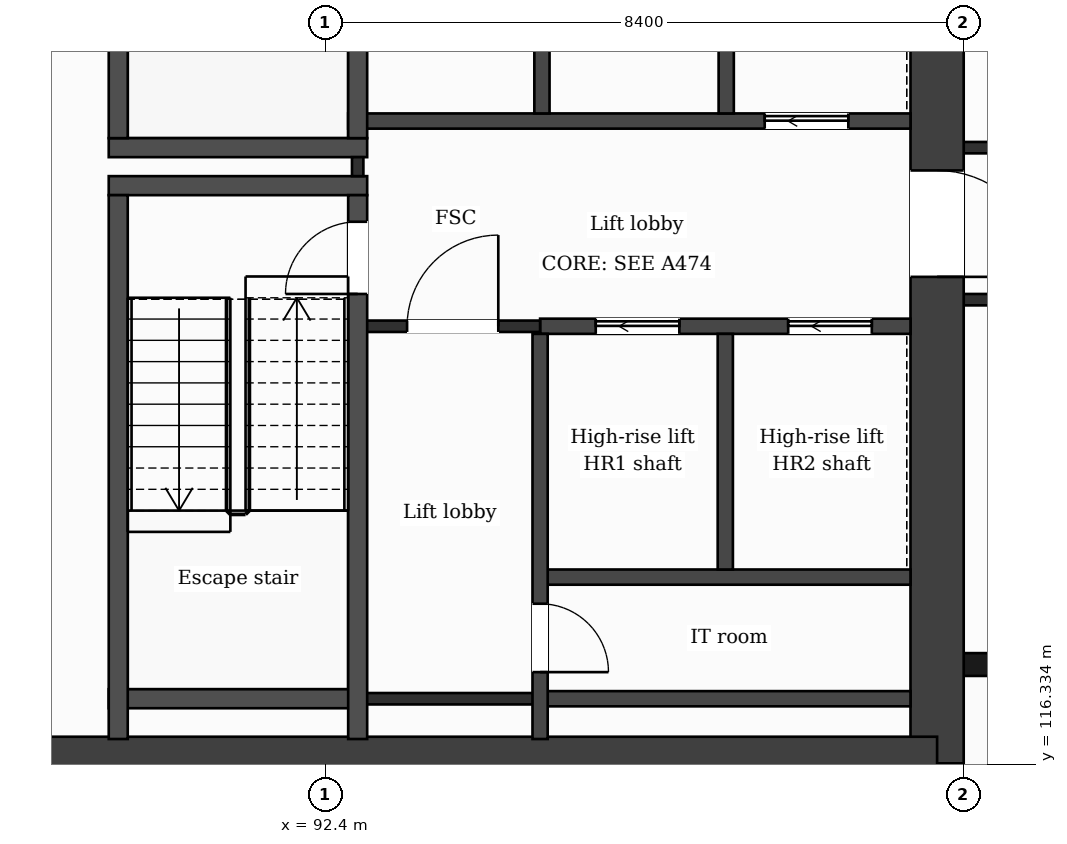
"""IFC4 building model, lengths in metres.
Left out: names, types, materials, properties, quantities, classifications, styles, units other than length and angle.
Written with IfcOpenShell. Run it as: python <this file> out.ifc"""

import sys

from ifc_helpers import new_model, si_unit, direction, frame, frame_2d, origin, place, context, subcontext, project, spatial, rectangle, extrude, element, fill, save


model = new_model("IFC4")
c1 = context("Model", 3, precision=1e-05, world=origin(), true_north=direction((0.0, 1.0)))
c2 = subcontext(c1, "Body", "Model", "MODEL_VIEW")
j1 = project(units=[si_unit("LENGTHUNIT", "METRE"), si_unit("PLANEANGLEUNIT", "RADIAN")], contexts=[c1])
p1 = place(None, origin())
s1 = spatial("IfcSite", under=j1, at=p1, CompositionType="ELEMENT")
p2 = place(p1, origin())
s2 = spatial("IfcBuilding", under=s1, at=p2, CompositionType="ELEMENT")
p3 = place(p2, frame((0.0, 0.0, 299.7)))
s3 = spatial("IfcBuildingStorey", under=s2, at=p3, CompositionType="ELEMENT", Elevation=299.7)
p4 = place(p3, frame((100.45, 132.05, 0.0), z_axis=(0.0, 0.0, 1.0), x_axis=(0.0, -1.0, 0.0)))
e1 = element("IfcWall", 1, at=p4, inside=s3, PredefinedType="SHEAR", context=c2, shape_type="SweptSolid", body=[
    extrude(rectangle(XDim=15.7, YDim=0.7, at=frame_2d((7.85, 0.0))), origin(), (0.0, 0.0, 1.0), 3.7),
])
p5 = place(p4, frame((7.9, 0.0, 0.0)))
e2 = element("IfcOpeningElement", 2, at=p5, cuts=e1, PredefinedType="OPENING", context=c2, shape_type="SweptSolid", body=[
    extrude(rectangle(XDim=1.4, YDim=2.1, at=frame_2d((0.7, 1.05))), frame((0.0, 0.36, 0.0), z_axis=(0.0, -1.0, 0.0), x_axis=(1.0, 0.0, 0.0)), (0.0, 0.0, 1.0), 0.72),
])
p6 = place(p3, frame((100.45, 116.35, 0.0), z_axis=(0.0, 0.0, 1.0), x_axis=(-1.0, 0.0, 0.0)))
e3 = element("IfcWall", 3, at=p6, inside=s3, PredefinedType="SHEAR", context=c2, shape_type="SweptSolid", body=[
    extrude(rectangle(XDim=13.627, YDim=0.7, at=frame_2d((6.813, 0.0))), origin(), (0.0, 0.0, 1.0), 3.7),
])
p7 = place(p3, frame((86.823, 116.35, 0.0), z_axis=(0.0, 0.0, 1.0), x_axis=(0.133416378607, 0.99106007382, 0.0)))
e4 = element("IfcWall", 4, at=p7, inside=s3, PredefinedType="SHEAR", context=c2, shape_type="SweptSolid", body=[
    extrude(rectangle(XDim=15.842, YDim=0.7, at=frame_2d((7.921, 0.0))), origin(), (0.0, 0.0, 1.0), 3.7),
])
p8 = place(p3, frame((100.8, 117.65, 0.0), z_axis=(0.0, 0.0, 1.0), x_axis=(1.0, 0.0, 0.0)))
e5 = element("IfcWall", 5, at=p8, inside=s3, PredefinedType="SOLIDWALL", context=c2, shape_type="SweptSolid", body=[
    extrude(rectangle(XDim=25.2, YDim=0.3, at=frame_2d((12.6, 0.0))), origin(), (0.0, 0.0, 1.0), 3.25),
])
p9 = place(p8, frame((0.95, 0.0, 0.9)))
e6 = element("IfcOpeningElement", 6, at=p9, cuts=e5, PredefinedType="OPENING", context=c2, shape_type="SweptSolid", body=[
    extrude(rectangle(XDim=2.4, YDim=2.1, at=frame_2d((1.2, 1.05))), frame((0.0, 0.16, 0.0), z_axis=(0.0, -1.0, 0.0), x_axis=(1.0, 0.0, 0.0)), (0.0, 0.0, 1.0), 0.32),
])
p10 = place(p8, frame((5.1, 0.0, 0.9)))
e7 = element("IfcOpeningElement", 7, at=p10, cuts=e5, PredefinedType="OPENING", context=c2, shape_type="SweptSolid", body=[
    extrude(rectangle(XDim=2.4, YDim=2.1, at=frame_2d((1.2, 1.05))), frame((0.0, 0.16, 0.0), z_axis=(0.0, -1.0, 0.0), x_axis=(1.0, 0.0, 0.0)), (0.0, 0.0, 1.0), 0.32),
])
p11 = place(p8, frame((9.3, 0.0, 0.9)))
e8 = element("IfcOpeningElement", 8, at=p11, cuts=e5, PredefinedType="OPENING", context=c2, shape_type="SweptSolid", body=[
    extrude(rectangle(XDim=2.4, YDim=2.1, at=frame_2d((1.2, 1.05))), frame((0.0, 0.16, 0.0), z_axis=(0.0, -1.0, 0.0), x_axis=(1.0, 0.0, 0.0)), (0.0, 0.0, 1.0), 0.32),
])
p12 = place(p8, frame((14.1, 0.0, 0.9)))
e9 = element("IfcOpeningElement", 9, at=p12, cuts=e5, PredefinedType="OPENING", context=c2, shape_type="SweptSolid", body=[
    extrude(rectangle(XDim=1.2, YDim=2.1, at=frame_2d((0.6, 1.05))), frame((0.0, 0.16, 0.0), z_axis=(0.0, -1.0, 0.0), x_axis=(1.0, 0.0, 0.0)), (0.0, 0.0, 1.0), 0.32),
])
p13 = place(p8, frame((18.3, 0.0, 0.9)))
e10 = element("IfcOpeningElement", 10, at=p13, cuts=e5, PredefinedType="OPENING", context=c2, shape_type="SweptSolid", body=[
    extrude(rectangle(XDim=1.2, YDim=2.1, at=frame_2d((0.6, 1.05))), frame((0.0, 0.16, 0.0), z_axis=(0.0, -1.0, 0.0), x_axis=(1.0, 0.0, 0.0)), (0.0, 0.0, 1.0), 0.32),
])
p14 = place(p8, frame((21.75, 0.0, 0.0)))
e11 = element("IfcOpeningElement", 11, at=p14, cuts=e5, PredefinedType="OPENING", context=c2, shape_type="SweptSolid", body=[
    extrude(rectangle(XDim=1.2, YDim=2.4, at=frame_2d((0.6, 1.2))), frame((0.0, 0.16, 0.0), z_axis=(0.0, -1.0, 0.0), x_axis=(1.0, 0.0, 0.0)), (0.0, 0.0, 1.0), 0.32),
])
p15 = place(p8, frame((23.55, 0.0, 0.9)))
e12 = element("IfcOpeningElement", 12, at=p15, cuts=e5, PredefinedType="OPENING", context=c2, shape_type="SweptSolid", body=[
    extrude(rectangle(XDim=1.2, YDim=2.1, at=frame_2d((0.6, 1.05))), frame((0.0, 0.16, 0.0), z_axis=(0.0, -1.0, 0.0), x_axis=(1.0, 0.0, 0.0)), (0.0, 0.0, 1.0), 0.32),
])
p16 = place(p3, frame((95.227, 117.2, 0.0), z_axis=(0.0, 0.0, 1.0), x_axis=(1.0, 0.0, 0.0)))
e13 = element("IfcWall", 13, at=p16, inside=s3, PredefinedType="PARTITIONING", context=c2, shape_type="SweptSolid", body=[
    extrude(rectangle(XDim=4.873, YDim=0.2, at=frame_2d((2.437, 0.0))), origin(), (0.0, 0.0, 1.0), 3.25),
])
p17 = place(p3, frame((92.827, 117.2, 0.0), z_axis=(0.0, 0.0, 1.0), x_axis=(1.0, 0.0, 0.0)))
e14 = element("IfcWall", 14, at=p17, inside=s3, PredefinedType="PARTITIONING", context=c2, shape_type="SweptSolid", body=[
    extrude(rectangle(XDim=2.4, YDim=0.15, at=frame_2d((1.2, 0.0))), origin(), (0.0, 0.0, 1.0), 3.25),
])
p18 = place(p3, frame((89.552, 117.2, 0.0), z_axis=(0.0, 0.0, 1.0), x_axis=(1.0, 0.0, 0.0)))
e15 = element("IfcWall", 15, at=p18, inside=s3, PredefinedType="PARTITIONING", context=c2, shape_type="SweptSolid", body=[
    extrude(rectangle(XDim=3.275, YDim=0.25, at=frame_2d((1.637, 0.0))), origin(), (0.0, 0.0, 1.0), 3.25),
])
p19 = place(p3, frame((95.227, 118.8, 0.0), z_axis=(0.0, 0.0, 1.0), x_axis=(1.0, 0.0, 0.0)))
e16 = element("IfcWall", 16, at=p19, inside=s3, PredefinedType="PARTITIONING", context=c2, shape_type="SweptSolid", body=[
    extrude(rectangle(XDim=4.873, YDim=0.2, at=frame_2d((2.437, 0.0))), origin(), (0.0, 0.0, 1.0), 3.25),
])
p20 = place(p3, frame((95.227, 122.1, 0.0), z_axis=(0.0, 0.0, 1.0), x_axis=(1.0, 0.0, 0.0)))
e17 = element("IfcWall", 17, at=p20, inside=s3, PredefinedType="PARTITIONING", context=c2, shape_type="SweptSolid", body=[
    extrude(rectangle(XDim=4.873, YDim=0.2, at=frame_2d((2.437, 0.0))), origin(), (0.0, 0.0, 1.0), 3.25),
])
p21 = place(p20, frame((0.732, 0.0, 0.0)))
e18 = element("IfcOpeningElement", 18, at=p21, cuts=e17, PredefinedType="OPENING", context=c2, shape_type="SweptSolid", body=[
    extrude(rectangle(XDim=1.1, YDim=2.1, at=frame_2d((0.55, 1.05))), frame((0.0, 0.11, 0.0), z_axis=(0.0, -1.0, 0.0), x_axis=(1.0, 0.0, 0.0)), (0.0, 0.0, 1.0), 0.22),
])
p22 = place(p20, frame((3.264, 0.0, 0.0)))
e19 = element("IfcOpeningElement", 19, at=p22, cuts=e17, PredefinedType="OPENING", context=c2, shape_type="SweptSolid", body=[
    extrude(rectangle(XDim=1.1, YDim=2.1, at=frame_2d((0.55, 1.05))), frame((0.0, 0.11, 0.0), z_axis=(0.0, -1.0, 0.0), x_axis=(1.0, 0.0, 0.0)), (0.0, 0.0, 1.0), 0.22),
])
p23 = place(p3, frame((92.827, 122.1, 0.0), z_axis=(0.0, 0.0, 1.0), x_axis=(1.0, 0.0, 0.0)))
e20 = element("IfcWall", 20, at=p23, inside=s3, PredefinedType="PARTITIONING", context=c2, shape_type="SweptSolid", body=[
    extrude(rectangle(XDim=2.4, YDim=0.15, at=frame_2d((1.2, 0.0))), origin(), (0.0, 0.0, 1.0), 3.25),
])
p24 = place(p23, frame((0.65, 0.0, 0.0)))
e21 = element("IfcOpeningElement", 21, at=p24, cuts=e20, PredefinedType="OPENING", context=c2, shape_type="SweptSolid", body=[
    extrude(rectangle(XDim=1.2, YDim=2.1, at=frame_2d((0.6, 1.05))), frame((0.0, 0.085, 0.0), z_axis=(0.0, -1.0, 0.0), x_axis=(1.0, 0.0, 0.0)), (0.0, 0.0, 1.0), 0.17),
])
p25 = place(p3, frame((100.8, 122.45, 0.0), z_axis=(0.0, 0.0, 1.0), x_axis=(1.0, 0.0, 0.0)))
e22 = element("IfcWall", 22, at=p25, inside=s3, PredefinedType="PARTITIONING", context=c2, shape_type="SweptSolid", body=[
    extrude(rectangle(XDim=25.2, YDim=0.15, at=frame_2d((12.6, 0.0))), origin(), (0.0, 0.0, 1.0), 3.25),
])
p26 = place(p25, frame((1.6, 0.0, 0.0)))
e23 = element("IfcOpeningElement", 23, at=p26, cuts=e22, PredefinedType="OPENING", context=c2, shape_type="SweptSolid", body=[
    extrude(rectangle(XDim=1.0, YDim=2.1, at=frame_2d((0.5, 1.05))), frame((0.0, 0.085, 0.0), z_axis=(0.0, -1.0, 0.0), x_axis=(1.0, 0.0, 0.0)), (0.0, 0.0, 1.0), 0.17),
])
p27 = place(p25, frame((11.12, 0.0, 0.0)))
e24 = element("IfcOpeningElement", 24, at=p27, cuts=e22, PredefinedType="OPENING", context=c2, shape_type="SweptSolid", body=[
    extrude(rectangle(XDim=0.95, YDim=2.1, at=frame_2d((0.475, 1.05))), frame((0.0, 0.085, 0.0), z_axis=(0.0, -1.0, 0.0), x_axis=(1.0, 0.0, 0.0)), (0.0, 0.0, 1.0), 0.17),
])
p28 = place(p25, frame((13.05, 0.0, 0.0)))
e25 = element("IfcOpeningElement", 25, at=p28, cuts=e22, PredefinedType="OPENING", context=c2, shape_type="SweptSolid", body=[
    extrude(rectangle(XDim=1.0, YDim=2.1, at=frame_2d((0.5, 1.05))), frame((0.0, 0.085, 0.0), z_axis=(0.0, -1.0, 0.0), x_axis=(1.0, 0.0, 0.0)), (0.0, 0.0, 1.0), 0.17),
])
p29 = place(p25, frame((19.61, 0.0, 0.0)))
e26 = element("IfcOpeningElement", 26, at=p29, cuts=e22, PredefinedType="OPENING", context=c2, shape_type="SweptSolid", body=[
    extrude(rectangle(XDim=0.95, YDim=2.1, at=frame_2d((0.475, 1.05))), frame((0.0, 0.085, 0.0), z_axis=(0.0, -1.0, 0.0), x_axis=(1.0, 0.0, 0.0)), (0.0, 0.0, 1.0), 0.17),
])
p30 = place(p25, frame((21.275, 0.0, 0.0)))
e27 = element("IfcOpeningElement", 27, at=p30, cuts=e22, PredefinedType="OPENING", context=c2, shape_type="SweptSolid", body=[
    extrude(rectangle(XDim=0.95, YDim=2.1, at=frame_2d((0.475, 1.05))), frame((0.0, 0.085, 0.0), z_axis=(0.0, -1.0, 0.0), x_axis=(1.0, 0.0, 0.0)), (0.0, 0.0, 1.0), 0.17),
])
for number, where, z_axis, x_axis in (
    (28, (89.552, 123.95, 0.0), (0.0, 0.0, 1.0), (1.0, 0.0, 0.0)),
    (29, (89.552, 124.45, 0.0), (0.0, 0.0, 1.0), (1.0, 0.0, 0.0)),
):
    element("IfcWall", number, at=place(p3, frame(where, z_axis=z_axis, x_axis=x_axis)), inside=s3, PredefinedType="PARTITIONING", context=c2, shape_type="SweptSolid", body=[
        extrude(rectangle(XDim=3.4, YDim=0.25, at=frame_2d((1.7, 0.0))), origin(), (0.0, 0.0, 1.0), 3.25),
    ])
p31 = place(p3, frame((100.8, 124.45, 0.0), z_axis=(0.0, 0.0, 1.0), x_axis=(1.0, 0.0, 0.0)))
e30 = element("IfcWall", 30, at=p31, inside=s3, PredefinedType="PARTITIONING", context=c2, shape_type="SweptSolid", body=[
    extrude(rectangle(XDim=25.2, YDim=0.15, at=frame_2d((12.6, 0.0))), origin(), (0.0, 0.0, 1.0), 3.25),
])
p32 = place(p31, frame((1.85, 0.0, 0.0)))
e31 = element("IfcOpeningElement", 31, at=p32, cuts=e30, PredefinedType="OPENING", context=c2, shape_type="SweptSolid", body=[
    extrude(rectangle(XDim=1.0, YDim=2.1, at=frame_2d((0.5, 1.05))), frame((0.0, 0.085, 0.0), z_axis=(0.0, -1.0, 0.0), x_axis=(1.0, 0.0, 0.0)), (0.0, 0.0, 1.0), 0.17),
])
p33 = place(p31, frame((6.425, 0.0, 0.0)))
e32 = element("IfcOpeningElement", 32, at=p33, cuts=e30, PredefinedType="OPENING", context=c2, shape_type="SweptSolid", body=[
    extrude(rectangle(XDim=1.0, YDim=2.1, at=frame_2d((0.5, 1.05))), frame((0.0, 0.085, 0.0), z_axis=(0.0, -1.0, 0.0), x_axis=(1.0, 0.0, 0.0)), (0.0, 0.0, 1.0), 0.17),
])
p34 = place(p31, frame((9.4, 0.0, 0.0)))
e33 = element("IfcOpeningElement", 33, at=p34, cuts=e30, PredefinedType="OPENING", context=c2, shape_type="SweptSolid", body=[
    extrude(rectangle(XDim=1.0, YDim=2.1, at=frame_2d((0.5, 1.05))), frame((0.0, 0.085, 0.0), z_axis=(0.0, -1.0, 0.0), x_axis=(1.0, 0.0, 0.0)), (0.0, 0.0, 1.0), 0.17),
])
p35 = place(p31, frame((14.825, 0.0, 0.0)))
e34 = element("IfcOpeningElement", 34, at=p35, cuts=e30, PredefinedType="OPENING", context=c2, shape_type="SweptSolid", body=[
    extrude(rectangle(XDim=1.0, YDim=2.1, at=frame_2d((0.5, 1.05))), frame((0.0, 0.085, 0.0), z_axis=(0.0, -1.0, 0.0), x_axis=(1.0, 0.0, 0.0)), (0.0, 0.0, 1.0), 0.17),
])
p36 = place(p31, frame((18.825, 0.0, 0.0)))
e35 = element("IfcOpeningElement", 35, at=p36, cuts=e30, PredefinedType="OPENING", context=c2, shape_type="SweptSolid", body=[
    extrude(rectangle(XDim=1.0, YDim=2.1, at=frame_2d((0.5, 1.05))), frame((0.0, 0.085, 0.0), z_axis=(0.0, -1.0, 0.0), x_axis=(1.0, 0.0, 0.0)), (0.0, 0.0, 1.0), 0.17),
])
p37 = place(p3, frame((92.702, 124.8, 0.0), z_axis=(0.0, 0.0, 1.0), x_axis=(1.0, 0.0, 0.0)))
e36 = element("IfcWall", 36, at=p37, inside=s3, PredefinedType="PARTITIONING", context=c2, shape_type="SweptSolid", body=[
    extrude(rectangle(XDim=7.398, YDim=0.2, at=frame_2d((3.699, 0.0))), origin(), (0.0, 0.0, 1.0), 3.25),
])
p38 = place(p37, frame((5.48, 0.0, 0.0)))
e37 = element("IfcOpeningElement", 37, at=p38, cuts=e36, PredefinedType="OPENING", context=c2, shape_type="SweptSolid", body=[
    extrude(rectangle(XDim=1.1, YDim=2.1, at=frame_2d((0.55, 1.05))), frame((0.0, 0.11, 0.0), z_axis=(0.0, -1.0, 0.0), x_axis=(1.0, 0.0, 0.0)), (0.0, 0.0, 1.0), 0.22),
])
for number, where, z_axis, x_axis in (
    (38, (89.677, 116.67, 0.0), (0.0, 0.0, 1.0), (0.0, 1.0, 0.0)),
    (39, (89.677, 124.575, 0.0), (0.0, 0.0, 1.0), (0.0, 1.0, 0.0)),
):
    element("IfcWall", number, at=place(p3, frame(where, z_axis=z_axis, x_axis=x_axis)), inside=s3, PredefinedType="PARTITIONING", context=c2, shape_type="SweptSolid", body=[
        extrude(rectangle(XDim=7.155, YDim=0.25, at=frame_2d((3.578, 0.0))), origin(), (0.0, 0.0, 1.0), 3.25),
    ])
p39 = place(p3, frame((92.827, 124.075, 0.0), z_axis=(0.0, 0.0, 1.0), x_axis=(0.0, 1.0, 0.0)))
e40 = element("IfcWall", 40, at=p39, inside=s3, PredefinedType="PARTITIONING", context=c2, shape_type="SweptSolid", body=[
    extrude(rectangle(XDim=0.25, YDim=0.15, at=frame_2d((0.125, 0.0))), origin(), (0.0, 0.0, 1.0), 3.25),
])
p40 = place(p3, frame((92.827, 116.67, 0.0), z_axis=(0.0, 0.0, 1.0), x_axis=(0.0, 1.0, 0.0)))
e41 = element("IfcWall", 41, at=p40, inside=s3, PredefinedType="PARTITIONING", context=c2, shape_type="SweptSolid", body=[
    extrude(rectangle(XDim=7.155, YDim=0.25, at=frame_2d((3.578, 0.0))), origin(), (0.0, 0.0, 1.0), 3.25),
])
p41 = place(p40, frame((5.855, 0.0, 0.0)))
e42 = element("IfcOpeningElement", 42, at=p41, cuts=e41, PredefinedType="OPENING", context=c2, shape_type="SweptSolid", body=[
    extrude(rectangle(XDim=0.95, YDim=2.1, at=frame_2d((0.475, 1.05))), frame((0.0, 0.135, 0.0), z_axis=(0.0, -1.0, 0.0), x_axis=(1.0, 0.0, 0.0)), (0.0, 0.0, 1.0), 0.27),
])
p42 = place(p3, frame((92.827, 124.575, 0.0), z_axis=(0.0, 0.0, 1.0), x_axis=(0.0, 1.0, 0.0)))
e43 = element("IfcWall", 43, at=p42, inside=s3, PredefinedType="PARTITIONING", context=c2, shape_type="SweptSolid", body=[
    extrude(rectangle(XDim=7.155, YDim=0.25, at=frame_2d((3.578, 0.0))), origin(), (0.0, 0.0, 1.0), 3.25),
])
p43 = place(p42, frame((5.325, 0.0, 0.0)))
e44 = element("IfcOpeningElement", 44, at=p43, cuts=e43, PredefinedType="OPENING", context=c2, shape_type="SweptSolid", body=[
    extrude(rectangle(XDim=1.0, YDim=2.1, at=frame_2d((0.5, 1.05))), frame((0.0, 0.135, 0.0), z_axis=(0.0, -1.0, 0.0), x_axis=(1.0, 0.0, 0.0)), (0.0, 0.0, 1.0), 0.27),
])
p44 = place(p3, frame((95.227, 116.67, 0.0), z_axis=(0.0, 0.0, 1.0), x_axis=(0.0, 1.0, 0.0)))
e45 = element("IfcWall", 45, at=p44, inside=s3, PredefinedType="PARTITIONING", context=c2, shape_type="SweptSolid", body=[
    extrude(rectangle(XDim=5.33, YDim=0.2, at=frame_2d((2.665, 0.0))), origin(), (0.0, 0.0, 1.0), 3.25),
])
p45 = place(p44, frame((0.88, 0.0, 0.0)))
e46 = element("IfcOpeningElement", 46, at=p45, cuts=e45, PredefinedType="OPENING", context=c2, shape_type="SweptSolid", body=[
    extrude(rectangle(XDim=0.9, YDim=2.1, at=frame_2d((0.45, 1.05))), frame((0.0, 0.11, 0.0), z_axis=(0.0, -1.0, 0.0), x_axis=(1.0, 0.0, 0.0)), (0.0, 0.0, 1.0), 0.22),
])
for number, where, z_axis, x_axis in (
    (47, (95.251, 124.9, 0.0), (0.0, 0.0, 1.0), (0.0, 1.0, 0.0)),
    (48, (97.664, 118.9, 0.0), (0.0, 0.0, 1.0), (0.0, 1.0, 0.0)),
    (49, (97.676, 124.9, 0.0), (0.0, 0.0, 1.0), (0.0, 1.0, 0.0)),
):
    element("IfcWall", number, at=place(p3, frame(where, z_axis=z_axis, x_axis=x_axis)), inside=s3, PredefinedType="PARTITIONING", context=c2, shape_type="SweptSolid", body=[
        extrude(rectangle(XDim=3.1, YDim=0.2, at=frame_2d((1.55, 0.0))), origin(), (0.0, 0.0, 1.0), 3.25),
    ])
p46 = place(p24, origin())
e50 = element("IfcDoor", 50, at=p46, inside=s3, OperationType="SINGLE_SWING_RIGHT", PredefinedType="DOOR", context=c2, shape_type="SweptSolid", body=[
    extrude(rectangle(XDim=1.2, YDim=2.1, at=frame_2d((0.6, 1.05))), frame((0.0, 0.025, 0.0), z_axis=(0.0, -1.0, 0.0), x_axis=(1.0, 0.0, 0.0)), (0.0, 0.0, 1.0), 0.05),
])
fill(e21, e50)
p47 = place(p21, origin())
e51 = element("IfcDoor", 51, at=p47, inside=s3, OperationType="SLIDING_TO_LEFT", PredefinedType="DOOR", context=c2, shape_type="SweptSolid", body=[
    extrude(rectangle(XDim=1.1, YDim=2.1, at=frame_2d((0.55, 1.05))), frame((0.0, 0.025, 0.0), z_axis=(0.0, -1.0, 0.0), x_axis=(1.0, 0.0, 0.0)), (0.0, 0.0, 1.0), 0.05),
])
fill(e18, e51)
p48 = place(p22, origin())
e52 = element("IfcDoor", 52, at=p48, inside=s3, OperationType="SLIDING_TO_LEFT", PredefinedType="DOOR", context=c2, shape_type="SweptSolid", body=[
    extrude(rectangle(XDim=1.1, YDim=2.1, at=frame_2d((0.55, 1.05))), frame((0.0, 0.025, 0.0), z_axis=(0.0, -1.0, 0.0), x_axis=(1.0, 0.0, 0.0)), (0.0, 0.0, 1.0), 0.05),
])
fill(e19, e52)
p49 = place(p38, origin())
e53 = element("IfcDoor", 53, at=p49, inside=s3, OperationType="SLIDING_TO_LEFT", PredefinedType="DOOR", context=c2, shape_type="SweptSolid", body=[
    extrude(rectangle(XDim=1.1, YDim=2.1, at=frame_2d((0.55, 1.05))), frame((0.0, 0.025, 0.0), z_axis=(0.0, -1.0, 0.0), x_axis=(1.0, 0.0, 0.0)), (0.0, 0.0, 1.0), 0.05),
])
fill(e37, e53)
p50 = place(p41, origin())
e54 = element("IfcDoor", 54, at=p50, inside=s3, OperationType="SINGLE_SWING_LEFT", PredefinedType="DOOR", context=c2, shape_type="SweptSolid", body=[
    extrude(rectangle(XDim=0.95, YDim=2.1, at=frame_2d((0.475, 1.05))), frame((0.0, 0.025, 0.0), z_axis=(0.0, -1.0, 0.0), x_axis=(1.0, 0.0, 0.0)), (0.0, 0.0, 1.0), 0.05),
])
fill(e42, e54)
p51 = place(p45, origin())
e55 = element("IfcDoor", 55, at=p51, inside=s3, OperationType="SINGLE_SWING_LEFT", PredefinedType="DOOR", context=c2, shape_type="SweptSolid", body=[
    extrude(rectangle(XDim=0.9, YDim=2.1, at=frame_2d((0.45, 1.05))), frame((0.0, 0.025, 0.0), z_axis=(0.0, -1.0, 0.0), x_axis=(1.0, 0.0, 0.0)), (0.0, 0.0, 1.0), 0.05),
])
fill(e46, e55)
p52 = place(p5, origin())
e56 = element("IfcDoor", 56, at=p52, inside=s3, OperationType="SINGLE_SWING_RIGHT", PredefinedType="DOOR", context=c2, shape_type="SweptSolid", body=[
    extrude(rectangle(XDim=1.4, YDim=2.1, at=frame_2d((0.7, 1.05))), frame((0.0, 0.025, 0.0), z_axis=(0.0, -1.0, 0.0), x_axis=(1.0, 0.0, 0.0)), (0.0, 0.0, 1.0), 0.05),
])
fill(e2, e56)
save(model, sys.argv[1])
